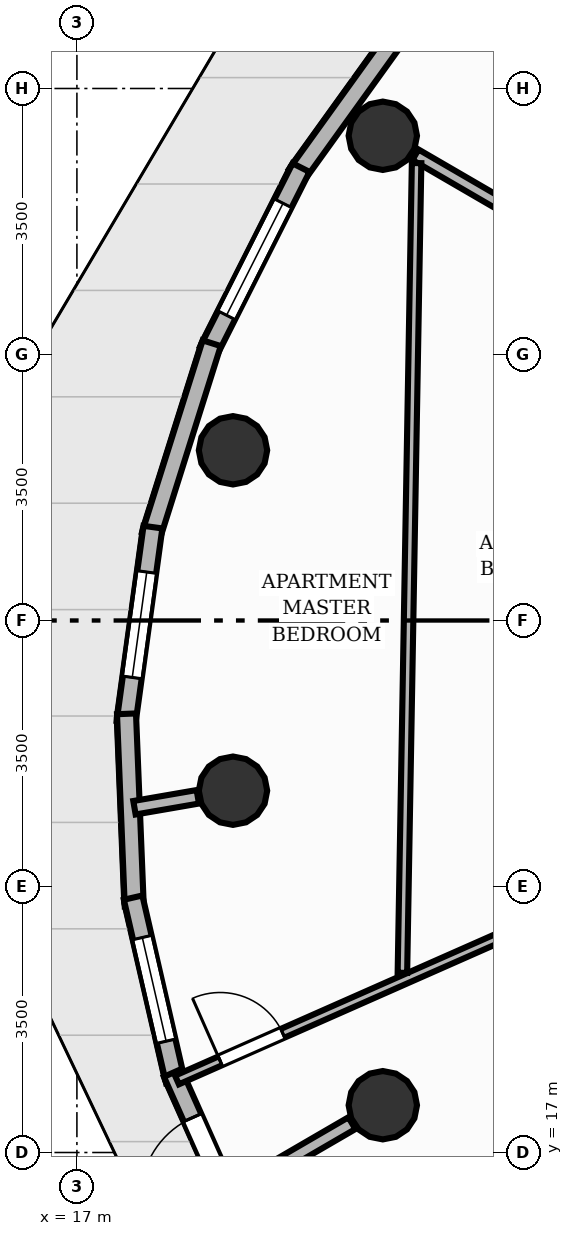
"""IFC4 building model, lengths in metres.
Left out: names, types, materials, properties, quantities, classifications, styles, units other than length and angle.
Written with IfcOpenShell. Run it as: python <this file> out.ifc"""

import sys

from ifc_helpers import new_model, si_unit, direction, frame, frame_2d, origin, origin_2d, place, context, subcontext, project, spatial, rectangle, circle, extrude, element, fill, save


model = new_model("IFC4")
c1 = context("Model", 3, precision=1e-05, world=origin(), true_north=direction((0.0, 1.0)))
c2 = subcontext(c1, "Body", "Model", "MODEL_VIEW")
j1 = project(units=[si_unit("LENGTHUNIT", "METRE"), si_unit("PLANEANGLEUNIT", "RADIAN")], contexts=[c1])
p1 = place(None, origin())
s1 = spatial("IfcSite", under=j1, at=p1, CompositionType="ELEMENT")
p2 = place(p1, origin())
s2 = spatial("IfcBuilding", under=s1, at=p2, CompositionType="ELEMENT")
p3 = place(p2, frame((0.0, 0.0, 172.64)))
s3 = spatial("IfcBuildingStorey", under=s2, at=p3, CompositionType="ELEMENT", Elevation=172.64)
for number, where, z_axis, x_axis in (
    (1, (21.025, 30.378, 0.0), (0.0, 0.0, 1.0), (1.0, 0.0, 0.0)),
    (2, (19.054, 26.24, 0.0), (0.0, 0.0, 1.0), (1.0, 0.0, 0.0)),
    (3, (19.054, 21.76, 0.0), (0.0, 0.0, 1.0), (1.0, 0.0, 0.0)),
    (4, (21.025, 17.622, 0.0), (0.0, 0.0, 1.0), (1.0, 0.0, 0.0)),
):
    element("IfcColumn", number, at=place(p3, frame(where, z_axis=z_axis, x_axis=x_axis)), inside=s3, PredefinedType="COLUMN", context=c2, shape_type="SweptSolid", body=[
        extrude(circle(Radius=0.45, at=origin_2d()), origin(), (0.0, 0.0, 1.0), 3.2),
    ])
p4 = place(p3, frame((19.892, 29.865, 0.0), z_axis=(0.0, 0.0, 1.0), x_axis=(0.583975860001, 0.811771023711, 0.0)))
e5 = element("IfcWall", 5, at=p4, inside=s3, PredefinedType="SOLIDWALL", context=c2, shape_type="SweptSolid", body=[
    extrude(rectangle(XDim=2.738, YDim=0.25, at=frame_2d((1.369, 0.0))), origin(), (0.0, 0.0, 1.0), 2.96),
])
p5 = place(p3, frame((18.732, 27.547, 0.0), z_axis=(0.0, 0.0, 1.0), x_axis=(0.450391703917, 0.892831066352, 0.0)))
e6 = element("IfcWall", 6, at=p5, inside=s3, PredefinedType="SOLIDWALL", context=c2, shape_type="SweptSolid", body=[
    extrude(rectangle(XDim=2.702, YDim=0.25, at=frame_2d((1.351, 0.0))), origin(), (0.0, 0.0, 1.0), 2.96),
])
p6 = place(p5, frame((0.526, 0.0, 0.85)))
e7 = element("IfcOpeningElement", 7, at=p6, cuts=e6, PredefinedType="OPENING", context=c2, shape_type="SweptSolid", body=[
    extrude(rectangle(XDim=1.65, YDim=1.55, at=frame_2d((0.825, 0.775))), frame((0.0, 0.135, 0.0), z_axis=(0.0, -1.0, 0.0), x_axis=(1.0, 0.0, 0.0)), (0.0, 0.0, 1.0), 0.27),
])
p7 = place(p3, frame((17.976, 25.12, 0.0), z_axis=(0.0, 0.0, 1.0), x_axis=(0.300796358401, 0.953688392911, 0.0)))
e8 = element("IfcWall", 8, at=p7, inside=s3, PredefinedType="SOLIDWALL", context=c2, shape_type="SweptSolid", body=[
    extrude(rectangle(XDim=2.651, YDim=0.25, at=frame_2d((1.325, 0.0))), origin(), (0.0, 0.0, 1.0), 2.96),
])
p8 = place(p3, frame((17.647, 22.66, 0.0), z_axis=(0.0, 0.0, 1.0), x_axis=(0.136289981327, 0.990668986589, 0.0)))
e9 = element("IfcWall", 9, at=p8, inside=s3, PredefinedType="SOLIDWALL", context=c2, shape_type="SweptSolid", body=[
    extrude(rectangle(XDim=2.592, YDim=0.25, at=frame_2d((1.296, 0.0))), origin(), (0.0, 0.0, 1.0), 2.96),
])
p9 = place(p8, frame((0.596, 0.0, 0.85)))
e10 = element("IfcOpeningElement", 10, at=p9, cuts=e9, PredefinedType="OPENING", context=c2, shape_type="SweptSolid", body=[
    extrude(rectangle(XDim=1.4, YDim=1.55, at=frame_2d((0.7, 0.775))), frame((0.0, 0.135, 0.0), z_axis=(0.0, -1.0, 0.0), x_axis=(1.0, 0.0, 0.0)), (0.0, 0.0, 1.0), 0.27),
])
p10 = place(p3, frame((17.755, 20.242, 0.0), z_axis=(0.0, 0.0, 1.0), x_axis=(-0.040399298921, 0.999183615081, 0.0)))
e11 = element("IfcWall", 11, at=p10, inside=s3, PredefinedType="SOLIDWALL", context=c2, shape_type="SweptSolid", body=[
    extrude(rectangle(XDim=2.532, YDim=0.25, at=frame_2d((1.266, 0.0))), origin(), (0.0, 0.0, 1.0), 2.96),
])
p11 = place(p3, frame((18.295, 17.939, 0.0), z_axis=(0.0, 0.0, 1.0), x_axis=(-0.224175769227, 0.974548728639, 0.0)))
e12 = element("IfcWall", 12, at=p11, inside=s3, PredefinedType="SOLIDWALL", context=c2, shape_type="SweptSolid", body=[
    extrude(rectangle(XDim=2.478, YDim=0.25, at=frame_2d((1.239, 0.0))), origin(), (0.0, 0.0, 1.0), 2.96),
])
p12 = place(p11, frame((0.539, 0.0, 0.85)))
e13 = element("IfcOpeningElement", 13, at=p12, cuts=e12, PredefinedType="OPENING", context=c2, shape_type="SweptSolid", body=[
    extrude(rectangle(XDim=1.4, YDim=1.55, at=frame_2d((0.7, 0.775))), frame((0.0, 0.135, 0.0), z_axis=(0.0, -1.0, 0.0), x_axis=(1.0, 0.0, 0.0)), (0.0, 0.0, 1.0), 0.27),
])
p13 = place(p3, frame((19.251, 15.821, 0.0), z_axis=(0.0, 0.0, 1.0), x_axis=(-0.407346511056, 0.913273682929, 0.0)))
e14 = element("IfcWall", 14, at=p13, inside=s3, PredefinedType="SOLIDWALL", context=c2, shape_type="SweptSolid", body=[
    extrude(rectangle(XDim=2.437, YDim=0.25, at=frame_2d((1.219, 0.0))), origin(), (0.0, 0.0, 1.0), 2.96),
])
p14 = place(p13, frame((0.643, 0.0, 0.0)))
e15 = element("IfcOpeningElement", 15, at=p14, cuts=e14, PredefinedType="OPENING", context=c2, shape_type="SweptSolid", body=[
    extrude(rectangle(XDim=1.15, YDim=2.2, at=frame_2d((0.575, 1.1))), frame((0.0, 0.135, 0.0), z_axis=(0.0, -1.0, 0.0), x_axis=(1.0, 0.0, 0.0)), (0.0, 0.0, 1.0), 0.27),
])
p15 = place(p3, frame((18.591, 21.68, 0.0), z_axis=(0.0, 0.0, 1.0), x_axis=(-0.985336508055, -0.170622290144, 0.0)))
e16 = element("IfcWall", 16, at=p15, inside=s3, PredefinedType="PARTITIONING", context=c2, shape_type="SweptSolid", body=[
    extrude(rectangle(XDim=0.846, YDim=0.18, at=frame_2d((0.423, 0.0))), origin(), (0.0, 0.0, 1.0), 2.404),
])
p16 = place(p3, frame((20.618, 17.386, 0.0), z_axis=(0.0, 0.0, 1.0), x_axis=(-0.864604991586, -0.502452195264, 0.0)))
e17 = element("IfcWall", 17, at=p16, inside=s3, PredefinedType="PARTITIONING", context=c2, shape_type="SweptSolid", body=[
    extrude(rectangle(XDim=1.841, YDim=0.18, at=frame_2d((0.92, 0.0))), origin(), (0.0, 0.0, 1.0), 2.404),
])
p17 = place(p3, frame((24.854, 29.527, 0.0), z_axis=(0.0, 0.0, 1.0), x_axis=(-0.663007196405, 0.748613022539, 0.0)))
e18 = element("IfcWall", 18, at=p17, inside=s3, PredefinedType="PLUMBINGWALL", context=c2, shape_type="SweptSolid", body=[
    extrude(rectangle(XDim=4.181, YDim=0.16, at=frame_2d((2.09, 0.0))), origin(), (0.0, 0.0, 1.0), 2.692),
])
p18 = place(p17, frame((1.64, 0.0, 0.0)))
e19 = element("IfcOpeningElement", 19, at=p18, cuts=e18, PredefinedType="OPENING", context=c2, shape_type="SweptSolid", body=[
    extrude(rectangle(XDim=0.9, YDim=2.1, at=frame_2d((0.45, 1.05))), frame((0.0, 0.09, 0.0), z_axis=(0.0, -1.0, 0.0), x_axis=(1.0, 0.0, 0.0)), (0.0, 0.0, 1.0), 0.18),
])
p19 = place(p3, frame((24.833, 28.164, 0.0), z_axis=(0.0, 0.0, 1.0), x_axis=(-0.864611299978, 0.50244133981, 0.0)))
e20 = element("IfcWall", 20, at=p19, inside=s3, PredefinedType="PLUMBINGWALL", context=c2, shape_type="SweptSolid", body=[
    extrude(rectangle(XDim=3.909, YDim=0.16, at=frame_2d((1.955, 0.0))), origin(), (0.0, 0.0, 1.0), 2.404),
])
p20 = place(p3, frame((18.317, 17.954, 0.0), z_axis=(0.0, 0.0, 1.0), x_axis=(0.914699105929, 0.404135553512, 0.0)))
e21 = element("IfcWall", 21, at=p20, inside=s3, PredefinedType="PARTITIONING", context=c2, shape_type="SweptSolid", body=[
    extrude(rectangle(XDim=7.219, YDim=0.125, at=frame_2d((3.609, 0.0))), origin(), (0.0, 0.0, 1.0), 2.692),
])
p21 = place(p20, frame((0.621, 0.0, 0.0)))
e22 = element("IfcOpeningElement", 22, at=p21, cuts=e21, PredefinedType="OPENING", context=c2, shape_type="SweptSolid", body=[
    extrude(rectangle(XDim=0.9, YDim=2.1, at=frame_2d((0.45, 1.05))), frame((0.0, 0.073, 0.0), z_axis=(0.0, -1.0, 0.0), x_axis=(1.0, 0.0, 0.0)), (0.0, 0.0, 1.0), 0.145),
])
p22 = place(p20, frame((4.77, 0.0, 0.0)))
e23 = element("IfcOpeningElement", 23, at=p22, cuts=e21, PredefinedType="OPENING", context=c2, shape_type="SweptSolid", body=[
    extrude(rectangle(XDim=0.9, YDim=2.1, at=frame_2d((0.45, 1.05))), frame((0.0, 0.073, 0.0), z_axis=(0.0, -1.0, 0.0), x_axis=(1.0, 0.0, 0.0)), (0.0, 0.0, 1.0), 0.145),
])
p23 = place(p3, frame((21.469, 30.019, 0.0), z_axis=(0.0, 0.0, 1.0), x_axis=(-0.017526694913, -0.999846395686, 0.0)))
e24 = element("IfcWall", 24, at=p23, inside=s3, PredefinedType="PARTITIONING", context=c2, shape_type="SweptSolid", body=[
    extrude(rectangle(XDim=10.656, YDim=0.125, at=frame_2d((5.328, 0.0))), origin(), (0.0, 0.0, 1.0), 2.955),
])
p24 = place(p14, origin())
e25 = element("IfcDoor", 25, at=p24, inside=s3, OperationType="SINGLE_SWING_LEFT", PredefinedType="DOOR", context=c2, shape_type="SweptSolid", body=[
    extrude(rectangle(XDim=1.15, YDim=2.2, at=frame_2d((0.575, 1.1))), frame((0.0, 0.025, 0.0), z_axis=(0.0, -1.0, 0.0), x_axis=(1.0, 0.0, 0.0)), (0.0, 0.0, 1.0), 0.05),
])
fill(e15, e25)
p25 = place(p6, origin())
e26 = element("IfcWindow", 26, at=p25, inside=s3, PartitioningType="SINGLE_PANEL", PredefinedType="WINDOW", context=c2, shape_type="SweptSolid", body=[
    extrude(rectangle(XDim=1.65, YDim=1.55, at=frame_2d((0.825, 0.775))), frame((0.0, 0.03, 0.0), z_axis=(0.0, -1.0, 0.0), x_axis=(1.0, 0.0, 0.0)), (0.0, 0.0, 1.0), 0.06),
])
fill(e7, e26)
p26 = place(p9, origin())
e27 = element("IfcWindow", 27, at=p26, inside=s3, PartitioningType="SINGLE_PANEL", PredefinedType="WINDOW", context=c2, shape_type="SweptSolid", body=[
    extrude(rectangle(XDim=1.4, YDim=1.55, at=frame_2d((0.7, 0.775))), frame((0.0, 0.03, 0.0), z_axis=(0.0, -1.0, 0.0), x_axis=(1.0, 0.0, 0.0)), (0.0, 0.0, 1.0), 0.06),
])
fill(e10, e27)
p27 = place(p12, origin())
e28 = element("IfcWindow", 28, at=p27, inside=s3, PartitioningType="SINGLE_PANEL", PredefinedType="WINDOW", context=c2, shape_type="SweptSolid", body=[
    extrude(rectangle(XDim=1.4, YDim=1.55, at=frame_2d((0.7, 0.775))), frame((0.0, 0.03, 0.0), z_axis=(0.0, -1.0, 0.0), x_axis=(1.0, 0.0, 0.0)), (0.0, 0.0, 1.0), 0.06),
])
fill(e13, e28)
p28 = place(p21, origin())
e29 = element("IfcDoor", 29, at=p28, inside=s3, OperationType="SINGLE_SWING_LEFT", PredefinedType="DOOR", context=c2, shape_type="SweptSolid", body=[
    extrude(rectangle(XDim=0.9, YDim=2.1, at=frame_2d((0.45, 1.05))), frame((0.0, 0.025, 0.0), z_axis=(0.0, -1.0, 0.0), x_axis=(1.0, 0.0, 0.0)), (0.0, 0.0, 1.0), 0.05),
])
fill(e22, e29)
save(model, sys.argv[1])
